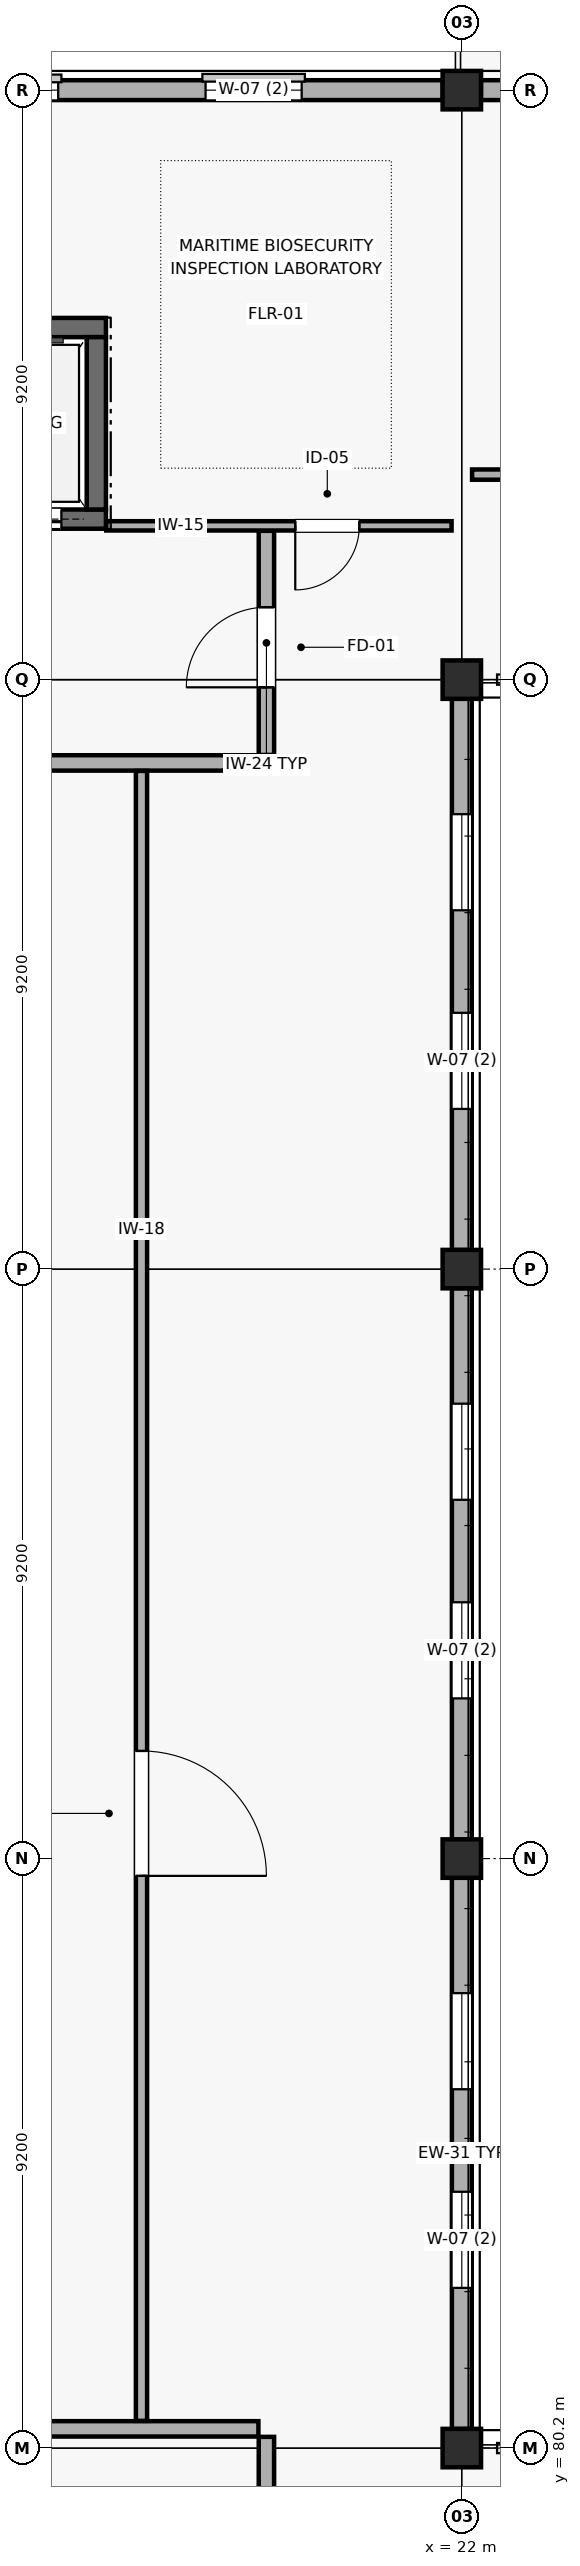
"""IFC4 building model, lengths in metres.
Left out: names, types, materials, properties, quantities, classifications, styles, units other than length and angle.
Written with IfcOpenShell. Run it as: python <this file> out.ifc"""

import sys

from ifc_helpers import new_model, si_unit, direction, frame, frame_2d, origin, origin_2d, place, context, subcontext, project, spatial, rectangle, extrude, element, fill, save


model = new_model("IFC4")
c1 = context("Model", 3, precision=1e-05, world=origin(), true_north=direction((0.0, 1.0)))
c2 = subcontext(c1, "Body", "Model", "MODEL_VIEW")
j1 = project(units=[si_unit("LENGTHUNIT", "METRE"), si_unit("PLANEANGLEUNIT", "RADIAN")], contexts=[c1])
p1 = place(None, origin())
s1 = spatial("IfcSite", under=j1, at=p1, CompositionType="ELEMENT")
p2 = place(p1, origin())
s2 = spatial("IfcBuilding", under=s1, at=p2, CompositionType="ELEMENT")
p3 = place(p2, frame((0.0, 0.0, 9.9)))
s3 = spatial("IfcBuildingStorey", under=s2, at=p3, CompositionType="ELEMENT", Elevation=9.9)
for number, where, z_axis, x_axis in (
    (1, (22.0, 80.2, 0.0), (0.0, 0.0, 1.0), (1.0, 0.0, 0.0)),
    (2, (22.0, 89.4, 0.0), (0.0, 0.0, 1.0), (1.0, 0.0, 0.0)),
    (3, (22.0, 98.6, 0.0), (0.0, 0.0, 1.0), (1.0, 0.0, 0.0)),
    (4, (22.0, 107.8, 0.0), (0.0, 0.0, 1.0), (1.0, 0.0, 0.0)),
    (5, (22.0, 117.0, 0.0), (0.0, 0.0, 1.0), (1.0, 0.0, 0.0)),
):
    element("IfcColumn", number, at=place(p3, frame(where, z_axis=z_axis, x_axis=x_axis)), inside=s3, PredefinedType="COLUMN", context=c2, shape_type="SweptSolid", body=[
        extrude(rectangle(XDim=0.6, YDim=0.6, at=origin_2d()), origin(), (0.0, 0.0, 1.0), 4.2),
    ])
p4 = place(p3, frame((21.702, 117.0, 0.0), z_axis=(0.0, 0.0, 1.0), x_axis=(-1.0, 0.0, 0.0)))
e6 = element("IfcWall", 6, at=p4, inside=s3, PredefinedType="SOLIDWALL", context=c2, shape_type="SweptSolid", body=[
    extrude(rectangle(XDim=10.404, YDim=0.31, at=frame_2d((5.202, 0.0))), origin(), (0.0, 0.0, 1.0), 3.425),
])
p5 = place(p4, frame((2.202, 0.0, 0.95)))
e7 = element("IfcOpeningElement", 7, at=p5, cuts=e6, PredefinedType="OPENING", context=c2, shape_type="SweptSolid", body=[
    extrude(rectangle(XDim=1.5, YDim=2.25, at=frame_2d((0.75, 1.125))), frame((0.0, 0.165, 0.0), z_axis=(0.0, -1.0, 0.0), x_axis=(1.0, 0.0, 0.0)), (0.0, 0.0, 1.0), 0.33),
])
p6 = place(p4, frame((6.002, 0.0, 0.95)))
e8 = element("IfcOpeningElement", 8, at=p6, cuts=e6, PredefinedType="OPENING", context=c2, shape_type="SweptSolid", body=[
    extrude(rectangle(XDim=1.5, YDim=2.25, at=frame_2d((0.75, 1.125))), frame((0.0, 0.165, 0.0), z_axis=(0.0, -1.0, 0.0), x_axis=(1.0, 0.0, 0.0)), (0.0, 0.0, 1.0), 0.33),
])
p7 = place(p3, frame((32.702, 117.0, 0.0), z_axis=(0.0, 0.0, 1.0), x_axis=(-1.0, 0.0, 0.0)))
e9 = element("IfcWall", 9, at=p7, inside=s3, PredefinedType="SOLIDWALL", context=c2, shape_type="SweptSolid", body=[
    extrude(rectangle(XDim=10.404, YDim=0.31, at=frame_2d((5.202, 0.0))), origin(), (0.0, 0.0, 1.0), 3.425),
])
p8 = place(p7, frame((4.802, 0.0, 0.0)))
e10 = element("IfcOpeningElement", 10, at=p8, cuts=e9, PredefinedType="OPENING", context=c2, shape_type="SweptSolid", body=[
    extrude(rectangle(XDim=1.2, YDim=2.2, at=frame_2d((0.6, 1.1))), frame((0.0, 0.165, 0.0), z_axis=(0.0, -1.0, 0.0), x_axis=(1.0, 0.0, 0.0)), (0.0, 0.0, 1.0), 0.33),
])
p9 = place(p3, frame((22.0, 80.498, 0.0), z_axis=(0.0, 0.0, 1.0), x_axis=(0.0, 1.0, 0.0)))
e11 = element("IfcWall", 11, at=p9, inside=s3, PredefinedType="SOLIDWALL", context=c2, shape_type="SweptSolid", body=[
    extrude(rectangle(XDim=8.604, YDim=0.31, at=frame_2d((4.302, 0.0))), origin(), (0.0, 0.0, 1.0), 3.525),
])
p10 = place(p9, frame((2.202, 0.0, 0.95)))
e12 = element("IfcOpeningElement", 12, at=p10, cuts=e11, PredefinedType="OPENING", context=c2, shape_type="SweptSolid", body=[
    extrude(rectangle(XDim=1.5, YDim=2.25, at=frame_2d((0.75, 1.125))), frame((0.0, 0.165, 0.0), z_axis=(0.0, -1.0, 0.0), x_axis=(1.0, 0.0, 0.0)), (0.0, 0.0, 1.0), 0.33),
])
p11 = place(p9, frame((5.302, 0.0, 0.95)))
e13 = element("IfcOpeningElement", 13, at=p11, cuts=e11, PredefinedType="OPENING", context=c2, shape_type="SweptSolid", body=[
    extrude(rectangle(XDim=1.5, YDim=2.25, at=frame_2d((0.75, 1.125))), frame((0.0, 0.165, 0.0), z_axis=(0.0, -1.0, 0.0), x_axis=(1.0, 0.0, 0.0)), (0.0, 0.0, 1.0), 0.33),
])
p12 = place(p3, frame((22.0, 89.698, 0.0), z_axis=(0.0, 0.0, 1.0), x_axis=(0.0, 1.0, 0.0)))
e14 = element("IfcWall", 14, at=p12, inside=s3, PredefinedType="SOLIDWALL", context=c2, shape_type="SweptSolid", body=[
    extrude(rectangle(XDim=8.604, YDim=0.31, at=frame_2d((4.302, 0.0))), origin(), (0.0, 0.0, 1.0), 3.525),
])
p13 = place(p12, frame((2.202, 0.0, 0.95)))
e15 = element("IfcOpeningElement", 15, at=p13, cuts=e14, PredefinedType="OPENING", context=c2, shape_type="SweptSolid", body=[
    extrude(rectangle(XDim=1.5, YDim=2.25, at=frame_2d((0.75, 1.125))), frame((0.0, 0.165, 0.0), z_axis=(0.0, -1.0, 0.0), x_axis=(1.0, 0.0, 0.0)), (0.0, 0.0, 1.0), 0.33),
])
p14 = place(p12, frame((5.302, 0.0, 0.95)))
e16 = element("IfcOpeningElement", 16, at=p14, cuts=e14, PredefinedType="OPENING", context=c2, shape_type="SweptSolid", body=[
    extrude(rectangle(XDim=1.5, YDim=2.25, at=frame_2d((0.75, 1.125))), frame((0.0, 0.165, 0.0), z_axis=(0.0, -1.0, 0.0), x_axis=(1.0, 0.0, 0.0)), (0.0, 0.0, 1.0), 0.33),
])
p15 = place(p3, frame((22.0, 98.898, 0.0), z_axis=(0.0, 0.0, 1.0), x_axis=(0.0, 1.0, 0.0)))
e17 = element("IfcWall", 17, at=p15, inside=s3, PredefinedType="SOLIDWALL", context=c2, shape_type="SweptSolid", body=[
    extrude(rectangle(XDim=8.604, YDim=0.31, at=frame_2d((4.302, 0.0))), origin(), (0.0, 0.0, 1.0), 3.525),
])
p16 = place(p15, frame((2.202, 0.0, 0.95)))
e18 = element("IfcOpeningElement", 18, at=p16, cuts=e17, PredefinedType="OPENING", context=c2, shape_type="SweptSolid", body=[
    extrude(rectangle(XDim=1.5, YDim=2.25, at=frame_2d((0.75, 1.125))), frame((0.0, 0.165, 0.0), z_axis=(0.0, -1.0, 0.0), x_axis=(1.0, 0.0, 0.0)), (0.0, 0.0, 1.0), 0.33),
])
p17 = place(p15, frame((5.302, 0.0, 0.95)))
e19 = element("IfcOpeningElement", 19, at=p17, cuts=e17, PredefinedType="OPENING", context=c2, shape_type="SweptSolid", body=[
    extrude(rectangle(XDim=1.5, YDim=2.25, at=frame_2d((0.75, 1.125))), frame((0.0, 0.165, 0.0), z_axis=(0.0, -1.0, 0.0), x_axis=(1.0, 0.0, 0.0)), (0.0, 0.0, 1.0), 0.33),
])
p18 = place(p3, frame((13.955, 110.305, 0.0), z_axis=(0.0, 0.0, 1.0), x_axis=(1.0, 0.0, 0.0)))
e20 = element("IfcWall", 20, at=p18, inside=s3, PredefinedType="SHEAR", context=c2, shape_type="SweptSolid", body=[
    extrude(rectangle(XDim=2.49, YDim=0.3, at=frame_2d((1.245, 0.0))), origin(), (0.0, 0.0, 1.0), 3.98),
])
p19 = place(p18, frame((0.695, 0.0, 0.0)))
e21 = element("IfcOpeningElement", 21, at=p19, cuts=e20, PredefinedType="OPENING", context=c2, shape_type="SweptSolid", body=[
    extrude(rectangle(XDim=1.1, YDim=2.15, at=frame_2d((0.55, 1.075))), frame((0.0, 0.16, 0.0), z_axis=(0.0, -1.0, 0.0), x_axis=(1.0, 0.0, 0.0)), (0.0, 0.0, 1.0), 0.32),
])
p20 = place(p3, frame((16.445, 113.295, 0.0), z_axis=(0.0, 0.0, 1.0), x_axis=(-1.0, 0.0, 0.0)))
e22 = element("IfcWall", 22, at=p20, inside=s3, PredefinedType="SHEAR", context=c2, shape_type="SweptSolid", body=[
    extrude(rectangle(XDim=2.49, YDim=0.3, at=frame_2d((1.245, 0.0))), origin(), (0.0, 0.0, 1.0), 3.98),
])
p21 = place(p3, frame((16.295, 110.455, 0.0), z_axis=(0.0, 0.0, 1.0), x_axis=(0.0, 1.0, 0.0)))
e23 = element("IfcWall", 23, at=p21, inside=s3, PredefinedType="SHEAR", context=c2, shape_type="SweptSolid", body=[
    extrude(rectangle(XDim=2.69, YDim=0.3, at=frame_2d((1.345, 0.0))), origin(), (0.0, 0.0, 1.0), 3.98),
])
p22 = place(p3, frame((0.16, 106.5, 0.0), z_axis=(0.0, 0.0, 1.0), x_axis=(1.0, 0.0, 0.0)))
e24 = element("IfcWall", 24, at=p22, inside=s3, PredefinedType="PARTITIONING", context=c2, shape_type="SweptSolid", body=[
    extrude(rectangle(XDim=18.665, YDim=0.24, at=frame_2d((9.333, 0.0))), origin(), (0.0, 0.0, 1.0), 3.525),
])
p23 = place(p22, frame((13.84, 0.0, 0.0)))
e25 = element("IfcOpeningElement", 25, at=p23, cuts=e24, PredefinedType="OPENING", context=c2, shape_type="SweptSolid", body=[
    extrude(rectangle(XDim=1.25, YDim=2.2, at=frame_2d((0.625, 1.1))), frame((0.0, 0.13, 0.0), z_axis=(0.0, -1.0, 0.0), x_axis=(1.0, 0.0, 0.0)), (0.0, 0.0, 1.0), 0.26),
])
p24 = place(p3, frame((0.16, 80.5, 0.0), z_axis=(0.0, 0.0, 1.0), x_axis=(1.0, 0.0, 0.0)))
e26 = element("IfcWall", 26, at=p24, inside=s3, PredefinedType="PARTITIONING", context=c2, shape_type="SweptSolid", body=[
    extrude(rectangle(XDim=18.665, YDim=0.24, at=frame_2d((9.333, 0.0))), origin(), (0.0, 0.0, 1.0), 3.425),
])
p25 = place(p24, frame((13.84, 0.0, 0.0)))
e27 = element("IfcOpeningElement", 27, at=p25, cuts=e26, PredefinedType="OPENING", context=c2, shape_type="SweptSolid", body=[
    extrude(rectangle(XDim=1.25, YDim=2.2, at=frame_2d((0.625, 1.1))), frame((0.0, 0.13, 0.0), z_axis=(0.0, -1.0, 0.0), x_axis=(1.0, 0.0, 0.0)), (0.0, 0.0, 1.0), 0.26),
])
p26 = place(p3, frame((17.0, 80.625, 0.0), z_axis=(0.0, 0.0, 1.0), x_axis=(0.0, 1.0, 0.0)))
e28 = element("IfcWall", 28, at=p26, inside=s3, PredefinedType="PARTITIONING", context=c2, shape_type="SweptSolid", body=[
    extrude(rectangle(XDim=25.75, YDim=0.175, at=frame_2d((12.875, 0.0))), origin(), (0.0, 0.0, 1.0), 3.425),
])
p27 = place(p26, frame((8.505, 0.0, 0.0)))
e29 = element("IfcOpeningElement", 29, at=p27, cuts=e28, PredefinedType="OPENING", context=c2, shape_type="SweptSolid", body=[
    extrude(rectangle(XDim=1.95, YDim=2.45, at=frame_2d((0.975, 1.225))), frame((0.0, 0.097, 0.0), z_axis=(0.0, -1.0, 0.0), x_axis=(1.0, 0.0, 0.0)), (0.0, 0.0, 1.0), 0.195),
])
p28 = place(p3, frame((18.95, 106.625, 0.0), z_axis=(0.0, 0.0, 1.0), x_axis=(0.0, 1.0, 0.0)))
e30 = element("IfcWall", 30, at=p28, inside=s3, PredefinedType="PARTITIONING", context=c2, shape_type="SweptSolid", body=[
    extrude(rectangle(XDim=3.498, YDim=0.24, at=frame_2d((1.749, 0.0))), origin(), (0.0, 0.0, 1.0), 3.425),
])
p29 = place(p28, frame((1.055, 0.0, 0.0)))
e31 = element("IfcOpeningElement", 31, at=p29, cuts=e30, PredefinedType="OPENING", context=c2, shape_type="SweptSolid", body=[
    extrude(rectangle(XDim=1.25, YDim=2.2, at=frame_2d((0.625, 1.1))), frame((0.0, 0.13, 0.0), z_axis=(0.0, -1.0, 0.0), x_axis=(1.0, 0.0, 0.0)), (0.0, 0.0, 1.0), 0.26),
])
p30 = place(p3, frame((18.95, 76.85, 0.0), z_axis=(0.0, 0.0, 1.0), x_axis=(0.0, 1.0, 0.0)))
e32 = element("IfcWall", 32, at=p30, inside=s3, PredefinedType="PARTITIONING", context=c2, shape_type="SweptSolid", body=[
    extrude(rectangle(XDim=3.525, YDim=0.24, at=frame_2d((1.762, 0.0))), origin(), (0.0, 0.0, 1.0), 3.425),
])
p31 = place(p30, frame((1.05, 0.0, 0.0)))
e33 = element("IfcOpeningElement", 33, at=p31, cuts=e32, PredefinedType="OPENING", context=c2, shape_type="SweptSolid", body=[
    extrude(rectangle(XDim=1.25, YDim=2.2, at=frame_2d((0.625, 1.1))), frame((0.0, 0.13, 0.0), z_axis=(0.0, -1.0, 0.0), x_axis=(1.0, 0.0, 0.0)), (0.0, 0.0, 1.0), 0.26),
])
p32 = place(p3, frame((16.45, 110.2, 0.0), z_axis=(0.0, 0.0, 1.0), x_axis=(1.0, 0.0, 0.0)))
e34 = element("IfcWall", 34, at=p32, inside=s3, PredefinedType="PARTITIONING", context=c2, shape_type="SweptSolid", body=[
    extrude(rectangle(XDim=5.39, YDim=0.145, at=frame_2d((2.695, 0.0))), origin(), (0.0, 0.0, 1.0), 3.98),
])
p33 = place(p32, frame((2.95, 0.0, 0.0)))
e35 = element("IfcOpeningElement", 35, at=p33, cuts=e34, PredefinedType="OPENING", context=c2, shape_type="SweptSolid", body=[
    extrude(rectangle(XDim=1.0, YDim=2.15, at=frame_2d((0.5, 1.075))), frame((0.0, 0.083, 0.0), z_axis=(0.0, -1.0, 0.0), x_axis=(1.0, 0.0, 0.0)), (0.0, 0.0, 1.0), 0.165),
])
p34 = place(p3, frame((22.16, 111.0, 0.0), z_axis=(0.0, 0.0, 1.0), x_axis=(1.0, 0.0, 0.0)))
e36 = element("IfcWall", 36, at=p34, inside=s3, PredefinedType="PARTITIONING", context=c2, shape_type="SweptSolid", body=[
    extrude(rectangle(XDim=43.68, YDim=0.16, at=frame_2d((21.84, 0.0))), origin(), (0.0, 0.0, 1.0), 3.525),
])
p35 = place(p34, frame((11.5, 0.0, 0.0)))
e37 = element("IfcOpeningElement", 37, at=p35, cuts=e36, PredefinedType="OPENING", context=c2, shape_type="SweptSolid", body=[
    extrude(rectangle(XDim=1.05, YDim=2.2, at=frame_2d((0.525, 1.1))), frame((0.0, 0.09, 0.0), z_axis=(0.0, -1.0, 0.0), x_axis=(1.0, 0.0, 0.0)), (0.0, 0.0, 1.0), 0.18),
])
p36 = place(p34, frame((34.5, 0.0, 0.0)))
e38 = element("IfcOpeningElement", 38, at=p36, cuts=e36, PredefinedType="OPENING", context=c2, shape_type="SweptSolid", body=[
    extrude(rectangle(XDim=1.15, YDim=2.2, at=frame_2d((0.575, 1.1))), frame((0.0, 0.09, 0.0), z_axis=(0.0, -1.0, 0.0), x_axis=(1.0, 0.0, 0.0)), (0.0, 0.0, 1.0), 0.18),
])
p37 = place(p5, origin())
e39 = element("IfcWindow", 39, at=p37, inside=s3, PartitioningType="SINGLE_PANEL", PredefinedType="WINDOW", context=c2, shape_type="SweptSolid", body=[
    extrude(rectangle(XDim=1.5, YDim=2.25, at=frame_2d((0.75, 1.125))), frame((0.0, 0.03, 0.0), z_axis=(0.0, -1.0, 0.0), x_axis=(1.0, 0.0, 0.0)), (0.0, 0.0, 1.0), 0.06),
])
fill(e7, e39)
p38 = place(p6, origin())
e40 = element("IfcWindow", 40, at=p38, inside=s3, PartitioningType="SINGLE_PANEL", PredefinedType="WINDOW", context=c2, shape_type="SweptSolid", body=[
    extrude(rectangle(XDim=1.5, YDim=2.25, at=frame_2d((0.75, 1.125))), frame((0.0, 0.03, 0.0), z_axis=(0.0, -1.0, 0.0), x_axis=(1.0, 0.0, 0.0)), (0.0, 0.0, 1.0), 0.06),
])
fill(e8, e40)
p39 = place(p10, origin())
e41 = element("IfcWindow", 41, at=p39, inside=s3, PartitioningType="SINGLE_PANEL", PredefinedType="WINDOW", context=c2, shape_type="SweptSolid", body=[
    extrude(rectangle(XDim=1.5, YDim=2.25, at=frame_2d((0.75, 1.125))), frame((0.0, 0.03, 0.0), z_axis=(0.0, -1.0, 0.0), x_axis=(1.0, 0.0, 0.0)), (0.0, 0.0, 1.0), 0.06),
])
fill(e12, e41)
p40 = place(p11, origin())
e42 = element("IfcWindow", 42, at=p40, inside=s3, PartitioningType="SINGLE_PANEL", PredefinedType="WINDOW", context=c2, shape_type="SweptSolid", body=[
    extrude(rectangle(XDim=1.5, YDim=2.25, at=frame_2d((0.75, 1.125))), frame((0.0, 0.03, 0.0), z_axis=(0.0, -1.0, 0.0), x_axis=(1.0, 0.0, 0.0)), (0.0, 0.0, 1.0), 0.06),
])
fill(e13, e42)
p41 = place(p13, origin())
e43 = element("IfcWindow", 43, at=p41, inside=s3, PartitioningType="SINGLE_PANEL", PredefinedType="WINDOW", context=c2, shape_type="SweptSolid", body=[
    extrude(rectangle(XDim=1.5, YDim=2.25, at=frame_2d((0.75, 1.125))), frame((0.0, 0.03, 0.0), z_axis=(0.0, -1.0, 0.0), x_axis=(1.0, 0.0, 0.0)), (0.0, 0.0, 1.0), 0.06),
])
fill(e15, e43)
p42 = place(p14, origin())
e44 = element("IfcWindow", 44, at=p42, inside=s3, PartitioningType="SINGLE_PANEL", PredefinedType="WINDOW", context=c2, shape_type="SweptSolid", body=[
    extrude(rectangle(XDim=1.5, YDim=2.25, at=frame_2d((0.75, 1.125))), frame((0.0, 0.03, 0.0), z_axis=(0.0, -1.0, 0.0), x_axis=(1.0, 0.0, 0.0)), (0.0, 0.0, 1.0), 0.06),
])
fill(e16, e44)
p43 = place(p16, origin())
e45 = element("IfcWindow", 45, at=p43, inside=s3, PartitioningType="SINGLE_PANEL", PredefinedType="WINDOW", context=c2, shape_type="SweptSolid", body=[
    extrude(rectangle(XDim=1.5, YDim=2.25, at=frame_2d((0.75, 1.125))), frame((0.0, 0.03, 0.0), z_axis=(0.0, -1.0, 0.0), x_axis=(1.0, 0.0, 0.0)), (0.0, 0.0, 1.0), 0.06),
])
fill(e18, e45)
p44 = place(p17, origin())
e46 = element("IfcWindow", 46, at=p44, inside=s3, PartitioningType="SINGLE_PANEL", PredefinedType="WINDOW", context=c2, shape_type="SweptSolid", body=[
    extrude(rectangle(XDim=1.5, YDim=2.25, at=frame_2d((0.75, 1.125))), frame((0.0, 0.03, 0.0), z_axis=(0.0, -1.0, 0.0), x_axis=(1.0, 0.0, 0.0)), (0.0, 0.0, 1.0), 0.06),
])
fill(e19, e46)
p45 = place(p19, frame((1.1, 0.0, 0.0), z_axis=(0.0, 0.0, 1.0), x_axis=(-1.0, 0.0, 0.0)))
e47 = element("IfcDoor", 47, at=p45, inside=s3, OperationType="DOUBLE_DOOR_SLIDING", PredefinedType="DOOR", context=c2, shape_type="SweptSolid", body=[
    extrude(rectangle(XDim=1.1, YDim=2.15, at=frame_2d((0.55, 1.075))), frame((0.0, 0.025, 0.0), z_axis=(0.0, -1.0, 0.0), x_axis=(1.0, 0.0, 0.0)), (0.0, 0.0, 1.0), 0.05),
])
fill(e21, e47)
p46 = place(p27, frame((1.95, 0.0, 0.0), z_axis=(0.0, 0.0, 1.0), x_axis=(-1.0, 0.0, 0.0)))
e48 = element("IfcDoor", 48, at=p46, inside=s3, OperationType="SINGLE_SWING_RIGHT", PredefinedType="DOOR", context=c2, shape_type="SweptSolid", body=[
    extrude(rectangle(XDim=1.95, YDim=2.45, at=frame_2d((0.975, 1.225))), frame((0.0, 0.025, 0.0), z_axis=(0.0, -1.0, 0.0), x_axis=(1.0, 0.0, 0.0)), (0.0, 0.0, 1.0), 0.05),
])
fill(e29, e48)
p47 = place(p29, origin())
e49 = element("IfcDoor", 49, at=p47, inside=s3, OperationType="SINGLE_SWING_LEFT", PredefinedType="DOOR", context=c2, shape_type="SweptSolid", body=[
    extrude(rectangle(XDim=1.25, YDim=2.2, at=frame_2d((0.625, 1.1))), frame((0.0, 0.025, 0.0), z_axis=(0.0, -1.0, 0.0), x_axis=(1.0, 0.0, 0.0)), (0.0, 0.0, 1.0), 0.05),
])
fill(e31, e49)
p48 = place(p33, frame((1.0, 0.0, 0.0), z_axis=(0.0, 0.0, 1.0), x_axis=(-1.0, 0.0, 0.0)))
e50 = element("IfcDoor", 50, at=p48, inside=s3, OperationType="SINGLE_SWING_RIGHT", PredefinedType="DOOR", context=c2, shape_type="SweptSolid", body=[
    extrude(rectangle(XDim=1.0, YDim=2.15, at=frame_2d((0.5, 1.075))), frame((0.0, 0.025, 0.0), z_axis=(0.0, -1.0, 0.0), x_axis=(1.0, 0.0, 0.0)), (0.0, 0.0, 1.0), 0.05),
])
fill(e35, e50)
save(model, sys.argv[1])
